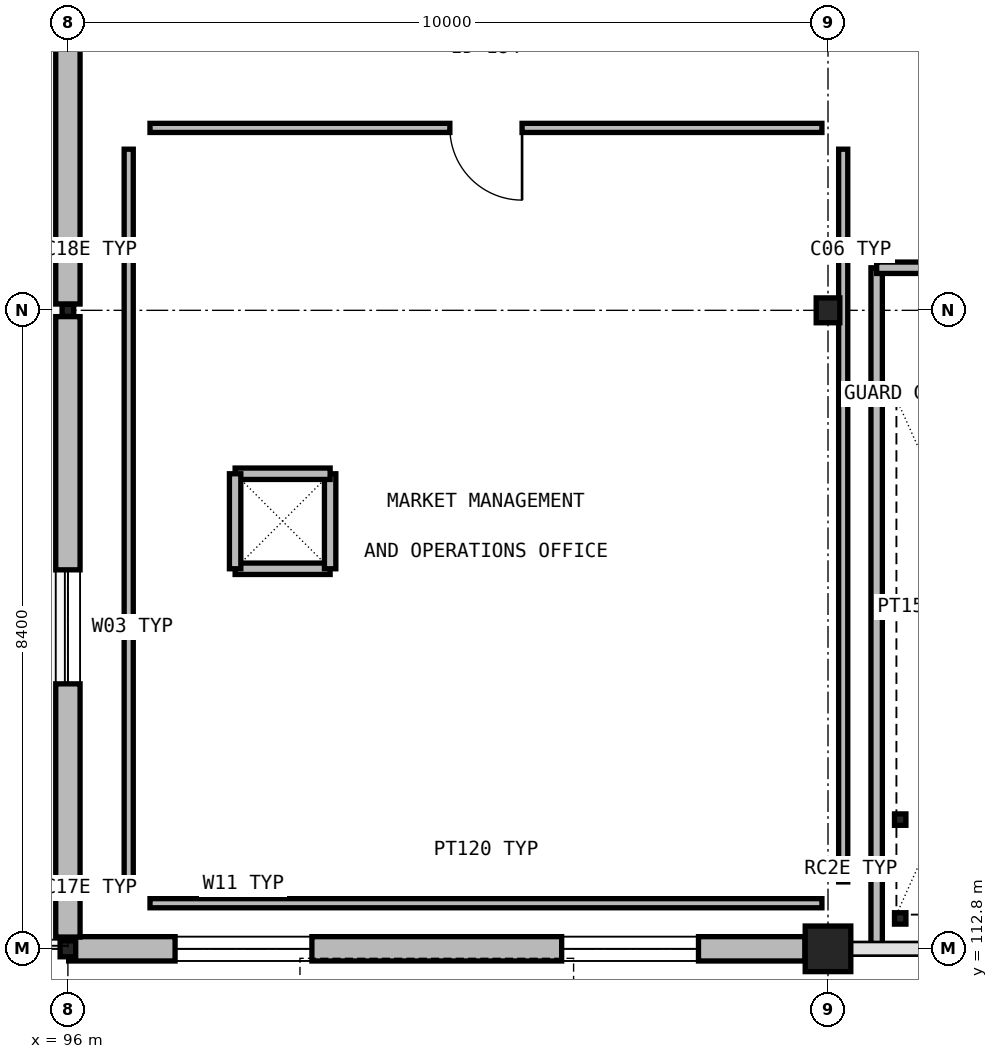
"""IFC4 building model, lengths in metres.
Left out: names, types, materials, properties, quantities, classifications, styles, units other than length and angle.
Written with IfcOpenShell. Run it as: python <this file> out.ifc"""

import sys

from ifc_helpers import new_model, si_unit, direction, frame, frame_2d, origin, origin_2d_with_axis, place, context, subcontext, project, spatial, rectangle, hollow_rectangle, i_section, extrude, element, fill, save


model = new_model("IFC4")
c1 = context("Model", 3, precision=1e-05, world=origin(), true_north=direction((0.0, 1.0)))
c2 = subcontext(c1, "Body", "Model", "MODEL_VIEW")
j1 = project(units=[si_unit("LENGTHUNIT", "METRE"), si_unit("PLANEANGLEUNIT", "RADIAN")], contexts=[c1])
p1 = place(None, origin())
s1 = spatial("IfcSite", under=j1, at=p1, CompositionType="ELEMENT")
p2 = place(p1, origin())
s2 = spatial("IfcBuilding", under=s1, at=p2, CompositionType="ELEMENT")
p3 = place(p2, frame((0.0, 0.0, 15.3)))
s3 = spatial("IfcBuildingStorey", under=s2, at=p3, CompositionType="ELEMENT", Elevation=15.3)
p4 = place(p3, frame((96.0, 112.8, 0.0), z_axis=(0.0, 0.0, 1.0), x_axis=(1.0, 0.0, 0.0)))
e1 = element("IfcColumn", 1, at=p4, inside=s3, PredefinedType="COLUMN", context=c2, shape_type="SweptSolid", body=[
    extrude(i_section(OverallWidth=0.205, OverallDepth=0.21, WebThickness=0.009, FlangeThickness=0.014, FilletRadius=0.011, at=origin_2d_with_axis()), origin(), (0.0, 0.0, 1.0), 3.3),
])
p5 = place(p3, frame((96.0, 121.2, 0.0), z_axis=(0.0, 0.0, 1.0), x_axis=(1.0, 0.0, 0.0)))
e2 = element("IfcColumn", 2, at=p5, inside=s3, PredefinedType="COLUMN", context=c2, shape_type="SweptSolid", body=[
    extrude(i_section(OverallWidth=0.153, OverallDepth=0.158, WebThickness=0.007, FlangeThickness=0.01, FilletRadius=0.009, at=origin_2d_with_axis()), origin(), (0.0, 0.0, 1.0), 3.3),
])
p6 = place(p3, frame((106.0, 112.8, 0.0), z_axis=(0.0, 0.0, 1.0), x_axis=(1.0, 0.0, 0.0)))
e3 = element("IfcColumn", 3, at=p6, inside=s3, PredefinedType="COLUMN", context=c2, shape_type="SweptSolid", body=[
    extrude(rectangle(XDim=0.6, YDim=0.6, at=origin_2d_with_axis()), origin(), (0.0, 0.0, 1.0), 3.3),
])
p7 = place(p3, frame((106.0, 121.2, 0.0), z_axis=(0.0, 0.0, 1.0), x_axis=(1.0, 0.0, 0.0)))
e4 = element("IfcColumn", 4, at=p7, inside=s3, PredefinedType="COLUMN", context=c2, shape_type="SweptSolid", body=[
    extrude(i_section(OverallWidth=0.311, OverallDepth=0.327, WebThickness=0.016, FlangeThickness=0.025, FilletRadius=0.017, at=origin_2d_with_axis()), origin(), (0.0, 0.0, 1.0), 3.3),
])
for number, where, z_axis, x_axis in (
    (5, (106.95, 113.2, 0.0), (0.0, 0.0, 1.0), (1.0, 0.0, 0.0)),
    (6, (106.95, 114.5, 0.0), (0.0, 0.0, 1.0), (1.0, 0.0, 0.0)),
):
    element("IfcColumn", number, at=place(p3, frame(where, z_axis=z_axis, x_axis=x_axis)), inside=s3, PredefinedType="COLUMN", context=c2, shape_type="SweptSolid", body=[
        extrude(hollow_rectangle(XDim=0.15, YDim=0.15, WallThickness=0.006, InnerFilletRadius=0.006, OuterFilletRadius=0.012, at=origin_2d_with_axis()), origin(), (0.0, 0.0, 1.0), 2.51),
    ])
p8 = place(p3, frame((96.01, 112.8, 0.0), z_axis=(0.0, 0.0, 1.0), x_axis=(1.0, 0.0, 0.0)))
e7 = element("IfcWall", 7, at=p8, inside=s3, PredefinedType="SOLIDWALL", context=c2, shape_type="SweptSolid", body=[
    extrude(rectangle(XDim=9.686, YDim=0.32, at=frame_2d((4.843, 0.0), x_axis=(1.0, 0.0))), origin(), (0.0, 0.0, 1.0), 2.94),
])
p9 = place(p8, frame((1.4, 0.0, 0.85)))
e8 = element("IfcOpeningElement", 8, at=p9, cuts=e7, PredefinedType="OPENING", context=c2, shape_type="SweptSolid", body=[
    extrude(rectangle(XDim=1.8, YDim=1.65, at=frame_2d((0.9, 0.825), x_axis=(1.0, 0.0))), frame((0.0, 0.17, 0.0), z_axis=(0.0, -1.0, 0.0), x_axis=(1.0, 0.0, 0.0)), (0.0, 0.0, 1.0), 0.34),
])
p10 = place(p8, frame((6.486, 0.0, 0.85)))
e9 = element("IfcOpeningElement", 9, at=p10, cuts=e7, PredefinedType="OPENING", context=c2, shape_type="SweptSolid", body=[
    extrude(rectangle(XDim=1.8, YDim=1.65, at=frame_2d((0.9, 0.825), x_axis=(1.0, 0.0))), frame((0.0, 0.17, 0.0), z_axis=(0.0, -1.0, 0.0), x_axis=(1.0, 0.0, 0.0)), (0.0, 0.0, 1.0), 0.34),
])
p11 = place(p3, frame((96.0, 121.117, 0.0), z_axis=(0.0, 0.0, 1.0), x_axis=(0.0, -1.0, 0.0)))
e10 = element("IfcWall", 10, at=p11, inside=s3, PredefinedType="SOLIDWALL", context=c2, shape_type="SweptSolid", body=[
    extrude(rectangle(XDim=8.162, YDim=0.32, at=frame_2d((4.081, 0.0), x_axis=(1.0, 0.0))), origin(), (0.0, 0.0, 1.0), 2.94),
])
p12 = place(p11, frame((3.331, 0.0, 0.85)))
e11 = element("IfcOpeningElement", 11, at=p12, cuts=e10, PredefinedType="OPENING", context=c2, shape_type="SweptSolid", body=[
    extrude(rectangle(XDim=1.5, YDim=1.6, at=frame_2d((0.75, 0.8), x_axis=(1.0, 0.0))), frame((0.0, 0.17, 0.0), z_axis=(0.0, -1.0, 0.0), x_axis=(1.0, 0.0, 0.0)), (0.0, 0.0, 1.0), 0.34),
])
p13 = place(p3, frame((96.0, 129.52, 0.0), z_axis=(0.0, 0.0, 1.0), x_axis=(0.0, -1.0, 0.0)))
e12 = element("IfcWall", 12, at=p13, inside=s3, PredefinedType="SOLIDWALL", context=c2, shape_type="SweptSolid", body=[
    extrude(rectangle(XDim=8.237, YDim=0.32, at=frame_2d((4.119, 0.0), x_axis=(1.0, 0.0))), origin(), (0.0, 0.0, 1.0), 2.94),
])
p14 = place(p13, frame((3.519, 0.0, 0.0)))
e13 = element("IfcOpeningElement", 13, at=p14, cuts=e12, PredefinedType="OPENING", context=c2, shape_type="SweptSolid", body=[
    extrude(rectangle(XDim=1.2, YDim=2.2, at=frame_2d((0.6, 1.1), x_axis=(1.0, 0.0))), frame((0.0, 0.17, 0.0), z_axis=(0.0, -1.0, 0.0), x_axis=(1.0, 0.0, 0.0)), (0.0, 0.0, 1.0), 0.34),
])
p15 = place(p3, frame((106.64, 121.76, 0.0), z_axis=(0.0, 0.0, 1.0), x_axis=(0.0, -1.0, 0.0)))
e14 = element("IfcWall", 14, at=p15, inside=s3, PredefinedType="PARTITIONING", context=c2, shape_type="SweptSolid", body=[
    extrude(rectangle(XDim=8.92, YDim=0.15, at=frame_2d((4.46, 0.0), x_axis=(1.0, 0.0))), origin(), (0.0, 0.0, 1.0), 2.51),
])
p16 = place(p3, frame((110.26, 121.76, 0.0), z_axis=(0.0, 0.0, 1.0), x_axis=(-1.0, 0.0, 0.0)))
e15 = element("IfcWall", 15, at=p16, inside=s3, PredefinedType="PARTITIONING", context=c2, shape_type="SweptSolid", body=[
    extrude(rectangle(XDim=3.62, YDim=0.15, at=frame_2d((1.81, 0.0), x_axis=(1.0, 0.0))), origin(), (0.0, 0.0, 1.0), 2.51),
])
p17 = place(p16, frame((1.31, 0.0, 0.0)))
e16 = element("IfcOpeningElement", 16, at=p17, cuts=e15, PredefinedType="OPENING", context=c2, shape_type="SweptSolid", body=[
    extrude(rectangle(XDim=1.0, YDim=2.15, at=frame_2d((0.5, 1.075), x_axis=(1.0, 0.0))), frame((0.0, 0.085, 0.0), z_axis=(0.0, -1.0, 0.0), x_axis=(1.0, 0.0, 0.0)), (0.0, 0.0, 1.0), 0.17),
])
for number, where, z_axis, x_axis in (
    (17, (98.2, 117.8, 0.0), (0.0, 0.0, 1.0), (1.0, 0.0, 0.0)),
    (18, (99.45, 117.8, 0.0), (0.0, 0.0, 1.0), (0.0, 1.0, 0.0)),
    (19, (99.45, 119.05, 0.0), (0.0, 0.0, 1.0), (-1.0, 0.0, 0.0)),
    (20, (98.2, 119.05, 0.0), (0.0, 0.0, 1.0), (0.0, -1.0, 0.0)),
):
    element("IfcWall", number, at=place(p3, frame(where, z_axis=z_axis, x_axis=x_axis)), inside=s3, PredefinedType="PARTITIONING", context=c2, shape_type="SweptSolid", body=[
        extrude(rectangle(XDim=1.25, YDim=0.15, at=frame_2d((0.625, 0.0), x_axis=(1.0, 0.0))), origin(), (0.0, 0.0, 1.0), 2.61),
    ])
p18 = place(p3, frame((97.08, 113.4, 0.0), z_axis=(0.0, 0.0, 1.0), x_axis=(1.0, 0.0, 0.0)))
e21 = element("IfcWall", 21, at=p18, inside=s3, PredefinedType="PARTITIONING", context=c2, shape_type="SweptSolid", body=[
    extrude(rectangle(XDim=8.84, YDim=0.12, at=frame_2d((4.42, 0.0), x_axis=(1.0, 0.0))), origin(), (0.0, 0.0, 1.0), 2.47),
])
p19 = place(p3, frame((106.2, 113.68, 0.0), z_axis=(0.0, 0.0, 1.0), x_axis=(0.0, 1.0, 0.0)))
e22 = element("IfcWall", 22, at=p19, inside=s3, PredefinedType="PARTITIONING", context=c2, shape_type="SweptSolid", body=[
    extrude(rectangle(XDim=9.64, YDim=0.12, at=frame_2d((4.82, 0.0), x_axis=(1.0, 0.0))), origin(), (0.0, 0.0, 1.0), 2.47),
])
p20 = place(p3, frame((105.92, 123.6, 0.0), z_axis=(0.0, 0.0, 1.0), x_axis=(-1.0, 0.0, 0.0)))
e23 = element("IfcWall", 23, at=p20, inside=s3, PredefinedType="PARTITIONING", context=c2, shape_type="SweptSolid", body=[
    extrude(rectangle(XDim=8.84, YDim=0.12, at=frame_2d((4.42, 0.0), x_axis=(1.0, 0.0))), origin(), (0.0, 0.0, 1.0), 2.47),
])
p21 = place(p20, frame((3.945, 0.0, 0.0)))
e24 = element("IfcOpeningElement", 24, at=p21, cuts=e23, PredefinedType="OPENING", context=c2, shape_type="SweptSolid", body=[
    extrude(rectangle(XDim=0.95, YDim=2.15, at=frame_2d((0.475, 1.075), x_axis=(1.0, 0.0))), frame((0.0, 0.07, 0.0), z_axis=(0.0, -1.0, 0.0), x_axis=(1.0, 0.0, 0.0)), (0.0, 0.0, 1.0), 0.14),
])
p22 = place(p3, frame((96.8, 123.32, 0.0), z_axis=(0.0, 0.0, 1.0), x_axis=(0.0, -1.0, 0.0)))
e25 = element("IfcWall", 25, at=p22, inside=s3, PredefinedType="PARTITIONING", context=c2, shape_type="SweptSolid", body=[
    extrude(rectangle(XDim=9.64, YDim=0.12, at=frame_2d((4.82, 0.0), x_axis=(1.0, 0.0))), origin(), (0.0, 0.0, 1.0), 2.47),
])
p23 = place(p9, origin())
e26 = element("IfcWindow", 26, at=p23, inside=s3, PartitioningType="SINGLE_PANEL", PredefinedType="WINDOW", context=c2, shape_type="SweptSolid", body=[
    extrude(rectangle(XDim=1.8, YDim=1.65, at=frame_2d((0.9, 0.825), x_axis=(1.0, 0.0))), frame((0.0, 0.03, 0.0), z_axis=(0.0, -1.0, 0.0), x_axis=(1.0, 0.0, 0.0)), (0.0, 0.0, 1.0), 0.06),
])
fill(e8, e26)
p24 = place(p10, origin())
e27 = element("IfcWindow", 27, at=p24, inside=s3, PartitioningType="SINGLE_PANEL", PredefinedType="WINDOW", context=c2, shape_type="SweptSolid", body=[
    extrude(rectangle(XDim=1.8, YDim=1.65, at=frame_2d((0.9, 0.825), x_axis=(1.0, 0.0))), frame((0.0, 0.03, 0.0), z_axis=(0.0, -1.0, 0.0), x_axis=(1.0, 0.0, 0.0)), (0.0, 0.0, 1.0), 0.06),
])
fill(e9, e27)
p25 = place(p12, origin())
e28 = element("IfcWindow", 28, at=p25, inside=s3, PartitioningType="SINGLE_PANEL", PredefinedType="WINDOW", context=c2, shape_type="SweptSolid", body=[
    extrude(rectangle(XDim=1.5, YDim=1.6, at=frame_2d((0.75, 0.8), x_axis=(1.0, 0.0))), frame((0.0, 0.03, 0.0), z_axis=(0.0, -1.0, 0.0), x_axis=(1.0, 0.0, 0.0)), (0.0, 0.0, 1.0), 0.06),
])
fill(e11, e28)
p26 = place(p21, origin())
e29 = element("IfcDoor", 29, at=p26, inside=s3, OperationType="SINGLE_SWING_LEFT", PredefinedType="DOOR", context=c2, shape_type="SweptSolid", body=[
    extrude(rectangle(XDim=0.95, YDim=2.15, at=frame_2d((0.475, 1.075), x_axis=(1.0, 0.0))), frame((0.0, 0.025, 0.0), z_axis=(0.0, -1.0, 0.0), x_axis=(1.0, 0.0, 0.0)), (0.0, 0.0, 1.0), 0.05),
])
fill(e24, e29)
save(model, sys.argv[1])
